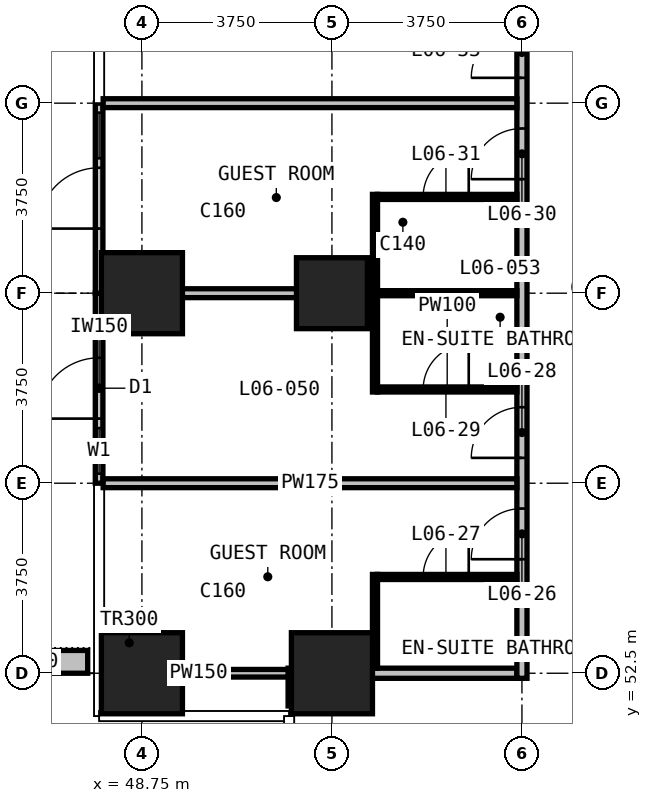
"""IFC4 building model, lengths in metres.
Left out: names, types, materials, properties, quantities, classifications, styles, units other than length and angle.
Written with IfcOpenShell. Run it as: python <this file> out.ifc"""

import sys

from ifc_helpers import new_model, si_unit, direction, frame, frame_2d, origin, origin_2d, place, context, subcontext, project, spatial, rectangle, extrude, element, fill, save


model = new_model("IFC4")
c1 = context("Model", 3, precision=1e-05, world=origin(), true_north=direction((0.0, 1.0)))
c2 = subcontext(c1, "Body", "Model", "MODEL_VIEW")
j1 = project(units=[si_unit("LENGTHUNIT", "METRE"), si_unit("PLANEANGLEUNIT", "RADIAN")], contexts=[c1])
p1 = place(None, origin())
s1 = spatial("IfcSite", under=j1, at=p1, CompositionType="ELEMENT")
p2 = place(p1, origin())
s2 = spatial("IfcBuilding", under=s1, at=p2, CompositionType="ELEMENT")
p3 = place(p2, frame((0.0, 0.0, 39.5)))
s3 = spatial("IfcBuildingStorey", under=s2, at=p3, CompositionType="ELEMENT", Elevation=39.5)
for number, where, z_axis, x_axis in (
    (1, (48.75, 52.5, 0.0), (0.0, 0.0, 1.0), (1.0, 0.0, 0.0)),
    (2, (48.75, 60.0, 0.0), (0.0, 0.0, 1.0), (1.0, 0.0, 0.0)),
    (3, (52.5, 52.5, 0.0), (0.0, 0.0, 1.0), (1.0, 0.0, 0.0)),
):
    element("IfcColumn", number, at=place(p3, frame(where, z_axis=z_axis, x_axis=x_axis)), inside=s3, PredefinedType="COLUMN", context=c2, shape_type="SweptSolid", body=[
        extrude(rectangle(XDim=1.6, YDim=1.6, at=origin_2d()), origin(), (0.0, 0.0, 1.0), 3.3),
    ])
p4 = place(p3, frame((52.5, 60.0, 0.0), z_axis=(0.0, 0.0, 1.0), x_axis=(1.0, 0.0, 0.0)))
e4 = element("IfcColumn", 4, at=p4, inside=s3, PredefinedType="COLUMN", context=c2, shape_type="SweptSolid", body=[
    extrude(rectangle(XDim=1.4, YDim=1.4, at=origin_2d()), origin(), (0.0, 0.0, 1.0), 3.3),
])
p5 = place(p3, frame((47.905, 56.25, 0.0), z_axis=(0.0, 0.0, 1.0), x_axis=(0.0, 1.0, 0.0)))
e5 = element("IfcWall", 5, at=p5, inside=s3, PredefinedType="SOLIDWALL", context=c2, shape_type="SweptSolid", body=[
    extrude(rectangle(XDim=3.75, YDim=0.15, at=frame_2d((1.875, 0.0))), origin(), (0.0, 0.0, 1.0), 3.0),
])
p6 = place(p5, frame((0.188, 0.0, 0.1)))
e6 = element("IfcOpeningElement", 6, at=p6, cuts=e5, PredefinedType="OPENING", context=c2, shape_type="SweptSolid", body=[
    extrude(rectangle(XDim=0.9, YDim=2.4, at=frame_2d((0.45, 1.2))), frame((0.0, 0.085, 0.0), z_axis=(0.0, -1.0, 0.0), x_axis=(1.0, 0.0, 0.0)), (0.0, 0.0, 1.0), 0.17),
])
p7 = place(p5, frame((1.275, 0.0, 0.0)))
e7 = element("IfcOpeningElement", 7, at=p7, cuts=e5, PredefinedType="OPENING", context=c2, shape_type="SweptSolid", body=[
    extrude(rectangle(XDim=1.2, YDim=2.4, at=frame_2d((0.6, 1.2))), frame((0.0, 0.085, 0.0), z_axis=(0.0, -1.0, 0.0), x_axis=(1.0, 0.0, 0.0)), (0.0, 0.0, 1.0), 0.17),
])
p8 = place(p3, frame((47.905, 60.0, 0.0), z_axis=(0.0, 0.0, 1.0), x_axis=(0.0, 1.0, 0.0)))
e8 = element("IfcWall", 8, at=p8, inside=s3, PredefinedType="SOLIDWALL", context=c2, shape_type="SweptSolid", body=[
    extrude(rectangle(XDim=3.75, YDim=0.15, at=frame_2d((1.875, 0.0))), origin(), (0.0, 0.0, 1.0), 3.0),
])
p9 = place(p8, frame((1.275, 0.0, 0.0)))
e9 = element("IfcOpeningElement", 9, at=p9, cuts=e8, PredefinedType="OPENING", context=c2, shape_type="SweptSolid", body=[
    extrude(rectangle(XDim=1.2, YDim=2.4, at=frame_2d((0.6, 1.2))), frame((0.0, 0.085, 0.0), z_axis=(0.0, -1.0, 0.0), x_axis=(1.0, 0.0, 0.0)), (0.0, 0.0, 1.0), 0.17),
])
p10 = place(p8, frame((2.663, 0.0, 0.1)))
e10 = element("IfcOpeningElement", 10, at=p10, cuts=e8, PredefinedType="OPENING", context=c2, shape_type="SweptSolid", body=[
    extrude(rectangle(XDim=0.9, YDim=2.4, at=frame_2d((0.45, 1.2))), frame((0.0, 0.085, 0.0), z_axis=(0.0, -1.0, 0.0), x_axis=(1.0, 0.0, 0.0)), (0.0, 0.0, 1.0), 0.17),
])
p11 = place(p3, frame((47.68, 52.725, 0.0), z_axis=(0.0, 0.0, 1.0), x_axis=(-1.0, 0.0, 0.0)))
e11 = element("IfcWall", 11, at=p11, inside=s3, PredefinedType="USERDEFINED", context=c2, shape_type="SweptSolid", body=[
    extrude(rectangle(XDim=2.33, YDim=0.45, at=frame_2d((1.165, 0.0))), origin(), (0.0, 0.0, 1.0), 1.1),
])
p12 = place(p3, frame((51.835, 52.5, 0.0), z_axis=(0.0, 0.0, 1.0), x_axis=(1.0, 0.0, 0.0)))
e12 = element("IfcWall", 12, at=p12, inside=s3, PredefinedType="PARTITIONING", context=c2, shape_type="SweptSolid", body=[
    extrude(rectangle(XDim=4.315, YDim=0.2, at=frame_2d((2.157, 0.0))), origin(), (0.0, 0.0, 1.0), 3.0),
])
p13 = place(p3, frame((51.735, 51.855, 0.0), z_axis=(0.0, 0.0, 1.0), x_axis=(0.0, 1.0, 0.0)))
e13 = element("IfcWall", 13, at=p13, inside=s3, PredefinedType="PARTITIONING", context=c2, shape_type="SweptSolid", body=[
    extrude(rectangle(XDim=0.745, YDim=0.2, at=frame_2d((0.373, 0.0))), origin(), (0.0, 0.0, 1.0), 3.0),
])
p14 = place(p3, frame((56.25, 52.4, 0.0), z_axis=(0.0, 0.0, 1.0), x_axis=(0.0, 1.0, 0.0)))
e14 = element("IfcWall", 14, at=p14, inside=s3, PredefinedType="PARTITIONING", context=c2, shape_type="SweptSolid", body=[
    extrude(rectangle(XDim=33.925, YDim=0.2, at=frame_2d((16.962, 0.0))), origin(), (0.0, 0.0, 1.0), 3.0),
])
p15 = place(p14, frame((2.35, 0.0, 0.0)))
e15 = element("IfcOpeningElement", 15, at=p15, cuts=e14, PredefinedType="OPENING", context=c2, shape_type="SweptSolid", body=[
    extrude(rectangle(XDim=1.0, YDim=2.2, at=frame_2d((0.5, 1.1))), frame((0.0, 0.11, 0.0), z_axis=(0.0, -1.0, 0.0), x_axis=(1.0, 0.0, 0.0)), (0.0, 0.0, 1.0), 0.22),
])
p16 = place(p14, frame((4.35, 0.0, 0.0)))
e16 = element("IfcOpeningElement", 16, at=p16, cuts=e14, PredefinedType="OPENING", context=c2, shape_type="SweptSolid", body=[
    extrude(rectangle(XDim=1.0, YDim=2.2, at=frame_2d((0.5, 1.1))), frame((0.0, 0.11, 0.0), z_axis=(0.0, -1.0, 0.0), x_axis=(1.0, 0.0, 0.0)), (0.0, 0.0, 1.0), 0.22),
])
p17 = place(p14, frame((9.85, 0.0, 0.0)))
e17 = element("IfcOpeningElement", 17, at=p17, cuts=e14, PredefinedType="OPENING", context=c2, shape_type="SweptSolid", body=[
    extrude(rectangle(XDim=1.0, YDim=2.2, at=frame_2d((0.5, 1.1))), frame((0.0, 0.11, 0.0), z_axis=(0.0, -1.0, 0.0), x_axis=(1.0, 0.0, 0.0)), (0.0, 0.0, 1.0), 0.22),
])
p18 = place(p14, frame((11.85, 0.0, 0.0)))
e18 = element("IfcOpeningElement", 18, at=p18, cuts=e14, PredefinedType="OPENING", context=c2, shape_type="SweptSolid", body=[
    extrude(rectangle(XDim=1.0, YDim=2.2, at=frame_2d((0.5, 1.1))), frame((0.0, 0.11, 0.0), z_axis=(0.0, -1.0, 0.0), x_axis=(1.0, 0.0, 0.0)), (0.0, 0.0, 1.0), 0.22),
])
p19 = place(p14, frame((17.35, 0.0, 0.0)))
e19 = element("IfcOpeningElement", 19, at=p19, cuts=e14, PredefinedType="OPENING", context=c2, shape_type="SweptSolid", body=[
    extrude(rectangle(XDim=1.0, YDim=2.2, at=frame_2d((0.5, 1.1))), frame((0.0, 0.11, 0.0), z_axis=(0.0, -1.0, 0.0), x_axis=(1.0, 0.0, 0.0)), (0.0, 0.0, 1.0), 0.22),
])
p20 = place(p14, frame((19.35, 0.0, 0.0)))
e20 = element("IfcOpeningElement", 20, at=p20, cuts=e14, PredefinedType="OPENING", context=c2, shape_type="SweptSolid", body=[
    extrude(rectangle(XDim=1.0, YDim=2.2, at=frame_2d((0.5, 1.1))), frame((0.0, 0.11, 0.0), z_axis=(0.0, -1.0, 0.0), x_axis=(1.0, 0.0, 0.0)), (0.0, 0.0, 1.0), 0.22),
])
p21 = place(p14, frame((24.85, 0.0, 0.0)))
e21 = element("IfcOpeningElement", 21, at=p21, cuts=e14, PredefinedType="OPENING", context=c2, shape_type="SweptSolid", body=[
    extrude(rectangle(XDim=1.0, YDim=2.2, at=frame_2d((0.5, 1.1))), frame((0.0, 0.11, 0.0), z_axis=(0.0, -1.0, 0.0), x_axis=(1.0, 0.0, 0.0)), (0.0, 0.0, 1.0), 0.22),
])
p22 = place(p14, frame((26.85, 0.0, 0.0)))
e22 = element("IfcOpeningElement", 22, at=p22, cuts=e14, PredefinedType="OPENING", context=c2, shape_type="SweptSolid", body=[
    extrude(rectangle(XDim=1.0, YDim=2.2, at=frame_2d((0.5, 1.1))), frame((0.0, 0.11, 0.0), z_axis=(0.0, -1.0, 0.0), x_axis=(1.0, 0.0, 0.0)), (0.0, 0.0, 1.0), 0.22),
])
p23 = place(p14, frame((31.55, 0.0, 0.0)))
e23 = element("IfcOpeningElement", 23, at=p23, cuts=e14, PredefinedType="OPENING", context=c2, shape_type="SweptSolid", body=[
    extrude(rectangle(XDim=0.9, YDim=2.2, at=frame_2d((0.45, 1.1))), frame((0.0, 0.11, 0.0), z_axis=(0.0, -1.0, 0.0), x_axis=(1.0, 0.0, 0.0)), (0.0, 0.0, 1.0), 0.22),
])
p24 = place(p3, frame((47.985, 56.25, 0.0), z_axis=(0.0, 0.0, 1.0), x_axis=(1.0, 0.0, 0.0)))
e24 = element("IfcWall", 24, at=p24, inside=s3, PredefinedType="PARTITIONING", context=c2, shape_type="SweptSolid", body=[
    extrude(rectangle(XDim=8.165, YDim=0.175, at=frame_2d((4.083, 0.0))), origin(), (0.0, 0.0, 1.0), 3.0),
])
p25 = place(p3, frame((47.985, 60.0, 0.0), z_axis=(0.0, 0.0, 1.0), x_axis=(1.0, 0.0, 0.0)))
e25 = element("IfcWall", 25, at=p25, inside=s3, PredefinedType="PARTITIONING", context=c2, shape_type="SweptSolid", body=[
    extrude(rectangle(XDim=5.315, YDim=0.175, at=frame_2d((2.657, 0.0))), origin(), (0.0, 0.0, 1.0), 3.0),
])
p26 = place(p3, frame((47.985, 63.75, 0.0), z_axis=(0.0, 0.0, 1.0), x_axis=(1.0, 0.0, 0.0)))
e26 = element("IfcWall", 26, at=p26, inside=s3, PredefinedType="PARTITIONING", context=c2, shape_type="SweptSolid", body=[
    extrude(rectangle(XDim=8.165, YDim=0.175, at=frame_2d((4.083, 0.0))), origin(), (0.0, 0.0, 1.0), 3.0),
])
p27 = place(p3, frame((48.105, 52.5, 0.0), z_axis=(0.0, 0.0, 1.0), x_axis=(1.0, 0.0, 0.0)))
e27 = element("IfcWall", 27, at=p27, inside=s3, PredefinedType="PARTITIONING", context=c2, shape_type="SweptSolid", body=[
    extrude(rectangle(XDim=3.53, YDim=0.15, at=frame_2d((1.765, 0.0))), origin(), (0.0, 0.0, 1.0), 3.0),
])
p28 = place(p3, frame((53.4, 54.4, 0.0), z_axis=(0.0, 0.0, 1.0), x_axis=(1.0, 0.0, 0.0)))
e28 = element("IfcWall", 28, at=p28, inside=s3, PredefinedType="PARTITIONING", context=c2, shape_type="SweptSolid", body=[
    extrude(rectangle(XDim=2.75, YDim=0.1, at=frame_2d((1.375, 0.0))), origin(), (0.0, 0.0, 1.0), 3.0),
])
p29 = place(p28, frame((0.9, 0.0, 0.0)))
e29 = element("IfcOpeningElement", 29, at=p29, cuts=e28, PredefinedType="OPENING", context=c2, shape_type="SweptSolid", body=[
    extrude(rectangle(XDim=0.9, YDim=2.2, at=frame_2d((0.45, 1.1))), frame((0.0, 0.06, 0.0), z_axis=(0.0, -1.0, 0.0), x_axis=(1.0, 0.0, 0.0)), (0.0, 0.0, 1.0), 0.12),
])
p30 = place(p3, frame((53.4, 58.1, 0.0), z_axis=(0.0, 0.0, 1.0), x_axis=(1.0, 0.0, 0.0)))
e30 = element("IfcWall", 30, at=p30, inside=s3, PredefinedType="PARTITIONING", context=c2, shape_type="SweptSolid", body=[
    extrude(rectangle(XDim=2.75, YDim=0.1, at=frame_2d((1.375, 0.0))), origin(), (0.0, 0.0, 1.0), 3.0),
])
p31 = place(p30, frame((0.9, 0.0, 0.0)))
e31 = element("IfcOpeningElement", 31, at=p31, cuts=e30, PredefinedType="OPENING", context=c2, shape_type="SweptSolid", body=[
    extrude(rectangle(XDim=0.9, YDim=2.2, at=frame_2d((0.45, 1.1))), frame((0.0, 0.06, 0.0), z_axis=(0.0, -1.0, 0.0), x_axis=(1.0, 0.0, 0.0)), (0.0, 0.0, 1.0), 0.12),
])
p32 = place(p3, frame((53.4, 60.0, 0.0), z_axis=(0.0, 0.0, 1.0), x_axis=(1.0, 0.0, 0.0)))
e32 = element("IfcWall", 32, at=p32, inside=s3, PredefinedType="PARTITIONING", context=c2, shape_type="SweptSolid", body=[
    extrude(rectangle(XDim=2.75, YDim=0.1, at=frame_2d((1.375, 0.0))), origin(), (0.0, 0.0, 1.0), 3.0),
])
p33 = place(p3, frame((53.4, 61.9, 0.0), z_axis=(0.0, 0.0, 1.0), x_axis=(1.0, 0.0, 0.0)))
e33 = element("IfcWall", 33, at=p33, inside=s3, PredefinedType="PARTITIONING", context=c2, shape_type="SweptSolid", body=[
    extrude(rectangle(XDim=2.75, YDim=0.1, at=frame_2d((1.375, 0.0))), origin(), (0.0, 0.0, 1.0), 3.0),
])
p34 = place(p33, frame((0.9, 0.0, 0.0)))
e34 = element("IfcOpeningElement", 34, at=p34, cuts=e33, PredefinedType="OPENING", context=c2, shape_type="SweptSolid", body=[
    extrude(rectangle(XDim=0.9, YDim=2.2, at=frame_2d((0.45, 1.1))), frame((0.0, 0.06, 0.0), z_axis=(0.0, -1.0, 0.0), x_axis=(1.0, 0.0, 0.0)), (0.0, 0.0, 1.0), 0.12),
])
p35 = place(p3, frame((53.35, 52.6, 0.0), z_axis=(0.0, 0.0, 1.0), x_axis=(0.0, 1.0, 0.0)))
e35 = element("IfcWall", 35, at=p35, inside=s3, PredefinedType="PARTITIONING", context=c2, shape_type="SweptSolid", body=[
    extrude(rectangle(XDim=1.85, YDim=0.1, at=frame_2d((0.925, 0.0))), origin(), (0.0, 0.0, 1.0), 3.0),
])
p36 = place(p3, frame((53.35, 58.05, 0.0), z_axis=(0.0, 0.0, 1.0), x_axis=(0.0, 1.0, 0.0)))
e36 = element("IfcWall", 36, at=p36, inside=s3, PredefinedType="PARTITIONING", context=c2, shape_type="SweptSolid", body=[
    extrude(rectangle(XDim=3.9, YDim=0.1, at=frame_2d((1.95, 0.0))), origin(), (0.0, 0.0, 1.0), 3.0),
])
p37 = place(p6, origin())
e37 = element("IfcWindow", 37, at=p37, inside=s3, PartitioningType="SINGLE_PANEL", PredefinedType="WINDOW", context=c2, shape_type="SweptSolid", body=[
    extrude(rectangle(XDim=0.9, YDim=2.4, at=frame_2d((0.45, 1.2))), frame((0.0, 0.03, 0.0), z_axis=(0.0, -1.0, 0.0), x_axis=(1.0, 0.0, 0.0)), (0.0, 0.0, 1.0), 0.06),
])
fill(e6, e37)
p38 = place(p7, origin())
e38 = element("IfcDoor", 38, at=p38, inside=s3, OperationType="SINGLE_SWING_LEFT", PredefinedType="DOOR", context=c2, shape_type="SweptSolid", body=[
    extrude(rectangle(XDim=1.2, YDim=2.4, at=frame_2d((0.6, 1.2))), frame((0.0, 0.025, 0.0), z_axis=(0.0, -1.0, 0.0), x_axis=(1.0, 0.0, 0.0)), (0.0, 0.0, 1.0), 0.05),
])
fill(e7, e38)
p39 = place(p9, origin())
e39 = element("IfcDoor", 39, at=p39, inside=s3, OperationType="SINGLE_SWING_LEFT", PredefinedType="DOOR", context=c2, shape_type="SweptSolid", body=[
    extrude(rectangle(XDim=1.2, YDim=2.4, at=frame_2d((0.6, 1.2))), frame((0.0, 0.025, 0.0), z_axis=(0.0, -1.0, 0.0), x_axis=(1.0, 0.0, 0.0)), (0.0, 0.0, 1.0), 0.05),
])
fill(e9, e39)
p40 = place(p10, origin())
e40 = element("IfcWindow", 40, at=p40, inside=s3, PartitioningType="SINGLE_PANEL", PredefinedType="WINDOW", context=c2, shape_type="SweptSolid", body=[
    extrude(rectangle(XDim=0.9, YDim=2.4, at=frame_2d((0.45, 1.2))), frame((0.0, 0.03, 0.0), z_axis=(0.0, -1.0, 0.0), x_axis=(1.0, 0.0, 0.0)), (0.0, 0.0, 1.0), 0.06),
])
fill(e10, e40)
p41 = place(p15, origin())
e41 = element("IfcDoor", 41, at=p41, inside=s3, OperationType="SINGLE_SWING_RIGHT", PredefinedType="DOOR", context=c2, shape_type="SweptSolid", body=[
    extrude(rectangle(XDim=1.0, YDim=2.2, at=frame_2d((0.5, 1.1))), frame((0.0, 0.025, 0.0), z_axis=(0.0, -1.0, 0.0), x_axis=(1.0, 0.0, 0.0)), (0.0, 0.0, 1.0), 0.05),
])
fill(e15, e41)
p42 = place(p29, origin())
e42 = element("IfcDoor", 42, at=p42, inside=s3, OperationType="SINGLE_SWING_RIGHT", PredefinedType="DOOR", context=c2, shape_type="SweptSolid", body=[
    extrude(rectangle(XDim=0.9, YDim=2.2, at=frame_2d((0.45, 1.1))), frame((0.0, 0.025, 0.0), z_axis=(0.0, -1.0, 0.0), x_axis=(1.0, 0.0, 0.0)), (0.0, 0.0, 1.0), 0.05),
])
fill(e29, e42)
p43 = place(p16, origin())
e43 = element("IfcDoor", 43, at=p43, inside=s3, OperationType="SINGLE_SWING_RIGHT", PredefinedType="DOOR", context=c2, shape_type="SweptSolid", body=[
    extrude(rectangle(XDim=1.0, YDim=2.2, at=frame_2d((0.5, 1.1))), frame((0.0, 0.025, 0.0), z_axis=(0.0, -1.0, 0.0), x_axis=(1.0, 0.0, 0.0)), (0.0, 0.0, 1.0), 0.05),
])
fill(e16, e43)
p44 = place(p31, origin())
e44 = element("IfcDoor", 44, at=p44, inside=s3, OperationType="SINGLE_SWING_RIGHT", PredefinedType="DOOR", context=c2, shape_type="SweptSolid", body=[
    extrude(rectangle(XDim=0.9, YDim=2.2, at=frame_2d((0.45, 1.1))), frame((0.0, 0.025, 0.0), z_axis=(0.0, -1.0, 0.0), x_axis=(1.0, 0.0, 0.0)), (0.0, 0.0, 1.0), 0.05),
])
fill(e31, e44)
p45 = place(p17, origin())
e45 = element("IfcDoor", 45, at=p45, inside=s3, OperationType="SINGLE_SWING_LEFT", PredefinedType="DOOR", context=c2, shape_type="SweptSolid", body=[
    extrude(rectangle(XDim=1.0, YDim=2.2, at=frame_2d((0.5, 1.1))), frame((0.0, 0.025, 0.0), z_axis=(0.0, -1.0, 0.0), x_axis=(1.0, 0.0, 0.0)), (0.0, 0.0, 1.0), 0.05),
])
fill(e17, e45)
p46 = place(p34, origin())
e46 = element("IfcDoor", 46, at=p46, inside=s3, OperationType="SINGLE_SWING_RIGHT", PredefinedType="DOOR", context=c2, shape_type="SweptSolid", body=[
    extrude(rectangle(XDim=0.9, YDim=2.2, at=frame_2d((0.45, 1.1))), frame((0.0, 0.025, 0.0), z_axis=(0.0, -1.0, 0.0), x_axis=(1.0, 0.0, 0.0)), (0.0, 0.0, 1.0), 0.05),
])
fill(e34, e46)
p47 = place(p18, origin())
e47 = element("IfcDoor", 47, at=p47, inside=s3, OperationType="SINGLE_SWING_LEFT", PredefinedType="DOOR", context=c2, shape_type="SweptSolid", body=[
    extrude(rectangle(XDim=1.0, YDim=2.2, at=frame_2d((0.5, 1.1))), frame((0.0, 0.025, 0.0), z_axis=(0.0, -1.0, 0.0), x_axis=(1.0, 0.0, 0.0)), (0.0, 0.0, 1.0), 0.05),
])
fill(e18, e47)
save(model, sys.argv[1])
